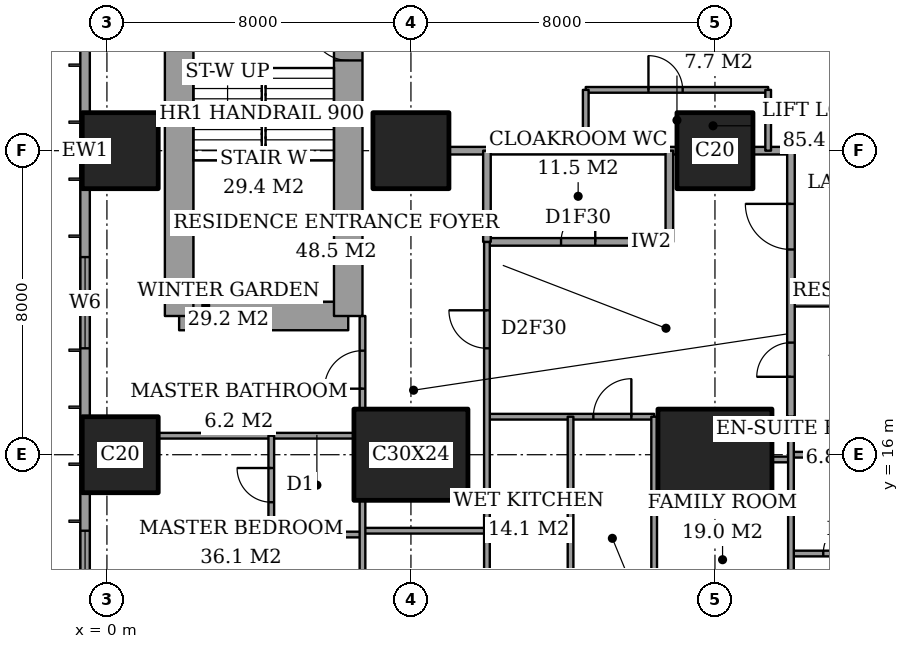
"""IFC4 building model, lengths in metres.
Left out: names, types, materials, properties, quantities, classifications, styles, units other than length and angle.
Written with IfcOpenShell. Run it as: python <this file> out.ifc"""

import sys

from ifc_helpers import new_model, si_unit, direction, frame, frame_2d, origin, origin_2d, place, context, subcontext, project, spatial, rectangle, extrude, element, fill, save


model = new_model("IFC4")
c1 = context("Model", 3, precision=1e-05, world=origin(), true_north=direction((0.0, 1.0)))
c2 = subcontext(c1, "Body", "Model", "MODEL_VIEW")
j1 = project(units=[si_unit("LENGTHUNIT", "METRE"), si_unit("PLANEANGLEUNIT", "RADIAN")], contexts=[c1])
p1 = place(None, origin())
s1 = spatial("IfcSite", under=j1, at=p1, CompositionType="ELEMENT")
p2 = place(p1, origin())
s2 = spatial("IfcBuilding", under=s1, at=p2, CompositionType="ELEMENT")
p3 = place(p2, frame((0.0, 0.0, 40.4)))
s3 = spatial("IfcBuildingStorey", under=s2, at=p3, CompositionType="ELEMENT", Elevation=40.4)
for number, where, z_axis, x_axis in (
    (1, (0.35, 16.0, 0.0), (0.0, 0.0, 1.0), (1.0, 0.0, 0.0)),
    (2, (0.35, 24.0, 0.0), (0.0, 0.0, 1.0), (1.0, 0.0, 0.0)),
):
    element("IfcColumn", number, at=place(p3, frame(where, z_axis=z_axis, x_axis=x_axis)), inside=s3, PredefinedType="COLUMN", context=c2, shape_type="SweptSolid", body=[
        extrude(rectangle(XDim=2.0, YDim=2.0, at=origin_2d()), origin(), (0.0, 0.0, 1.0), 3.6),
    ])
p4 = place(p3, frame((8.0, 16.0, 0.0), z_axis=(0.0, 0.0, 1.0), x_axis=(1.0, 0.0, 0.0)))
e3 = element("IfcColumn", 3, at=p4, inside=s3, PredefinedType="COLUMN", context=c2, shape_type="SweptSolid", body=[
    extrude(rectangle(XDim=3.0, YDim=2.4, at=origin_2d()), origin(), (0.0, 0.0, 1.0), 3.6),
])
p5 = place(p3, frame((8.0, 24.0, 0.0), z_axis=(0.0, 0.0, 1.0), x_axis=(1.0, 0.0, 0.0)))
e4 = element("IfcColumn", 4, at=p5, inside=s3, PredefinedType="COLUMN", context=c2, shape_type="SweptSolid", body=[
    extrude(rectangle(XDim=2.0, YDim=2.0, at=origin_2d()), origin(), (0.0, 0.0, 1.0), 3.6),
])
p6 = place(p3, frame((16.0, 16.0, 0.0), z_axis=(0.0, 0.0, 1.0), x_axis=(1.0, 0.0, 0.0)))
e5 = element("IfcColumn", 5, at=p6, inside=s3, PredefinedType="COLUMN", context=c2, shape_type="SweptSolid", body=[
    extrude(rectangle(XDim=3.0, YDim=2.4, at=origin_2d()), origin(), (0.0, 0.0, 1.0), 3.6),
])
p7 = place(p3, frame((16.0, 24.0, 0.0), z_axis=(0.0, 0.0, 1.0), x_axis=(1.0, 0.0, 0.0)))
e6 = element("IfcColumn", 6, at=p7, inside=s3, PredefinedType="COLUMN", context=c2, shape_type="SweptSolid", body=[
    extrude(rectangle(XDim=2.0, YDim=2.0, at=origin_2d()), origin(), (0.0, 0.0, 1.0), 3.6),
])
p8 = place(p3, frame((1.9, 19.65, 0.0), z_axis=(0.0, 0.0, 1.0), x_axis=(1.0, 0.0, 0.0)))
e7 = element("IfcWall", 7, at=p8, inside=s3, PredefinedType="SHEAR", context=c2, shape_type="SweptSolid", body=[
    extrude(rectangle(XDim=4.45, YDim=0.75, at=frame_2d((2.225, 0.0))), origin(), (0.0, 0.0, 1.0), 3.6),
])
p9 = place(p3, frame((6.35, 19.65, 0.0), z_axis=(0.0, 0.0, 1.0), x_axis=(0.0, 1.0, 0.0)))
e8 = element("IfcWall", 8, at=p9, inside=s3, PredefinedType="SHEAR", context=c2, shape_type="SweptSolid", body=[
    extrude(rectangle(XDim=8.7, YDim=0.75, at=frame_2d((4.35, 0.0))), origin(), (0.0, 0.0, 1.0), 3.6),
])
p10 = place(p9, frame((6.725, 0.0, 0.0)))
e9 = element("IfcOpeningElement", 9, at=p10, cuts=e8, PredefinedType="OPENING", context=c2, shape_type="SweptSolid", body=[
    extrude(rectangle(XDim=1.0, YDim=2.1, at=frame_2d((0.5, 1.05))), frame((0.0, 0.385, 0.0), z_axis=(0.0, -1.0, 0.0), x_axis=(1.0, 0.0, 0.0)), (0.0, 0.0, 1.0), 0.77),
])
p11 = place(p3, frame((1.9, 28.35, 0.0), z_axis=(0.0, 0.0, 1.0), x_axis=(0.0, -1.0, 0.0)))
e10 = element("IfcWall", 10, at=p11, inside=s3, PredefinedType="SHEAR", context=c2, shape_type="SweptSolid", body=[
    extrude(rectangle(XDim=8.7, YDim=0.75, at=frame_2d((4.35, 0.0))), origin(), (0.0, 0.0, 1.0), 3.6),
])
p12 = place(p3, frame((-0.575, 44.825, 0.0), z_axis=(0.0, 0.0, 1.0), x_axis=(0.0, -1.0, 0.0)))
e11 = element("IfcWall", 11, at=p12, inside=s3, PredefinedType="SOLIDWALL", context=c2, shape_type="SweptSolid", body=[
    extrude(rectangle(XDim=41.65, YDim=0.25, at=frame_2d((20.825, 0.0))), origin(), (0.0, 0.0, 1.0), 3.6),
])
p13 = place(p12, frame((0.775, 0.0, 0.6)))
e12 = element("IfcOpeningElement", 12, at=p13, cuts=e11, PredefinedType="OPENING", context=c2, shape_type="SweptSolid", body=[
    extrude(rectangle(XDim=2.4, YDim=2.0, at=frame_2d((1.2, 1.0))), frame((0.0, 0.135, 0.0), z_axis=(0.0, -1.0, 0.0), x_axis=(1.0, 0.0, 0.0)), (0.0, 0.0, 1.0), 0.27),
])
p14 = place(p12, frame((6.1, 0.0, 0.6)))
e13 = element("IfcOpeningElement", 13, at=p14, cuts=e11, PredefinedType="OPENING", context=c2, shape_type="SweptSolid", body=[
    extrude(rectangle(XDim=1.2, YDim=2.0, at=frame_2d((0.6, 1.0))), frame((0.0, 0.135, 0.0), z_axis=(0.0, -1.0, 0.0), x_axis=(1.0, 0.0, 0.0)), (0.0, 0.0, 1.0), 0.27),
])
p15 = place(p12, frame((8.425, 0.0, 0.6)))
e14 = element("IfcOpeningElement", 14, at=p15, cuts=e11, PredefinedType="OPENING", context=c2, shape_type="SweptSolid", body=[
    extrude(rectangle(XDim=2.4, YDim=2.0, at=frame_2d((1.2, 1.0))), frame((0.0, 0.135, 0.0), z_axis=(0.0, -1.0, 0.0), x_axis=(1.0, 0.0, 0.0)), (0.0, 0.0, 1.0), 0.27),
])
p16 = place(p12, frame((15.625, 0.0, 0.6)))
e15 = element("IfcOpeningElement", 15, at=p16, cuts=e11, PredefinedType="OPENING", context=c2, shape_type="SweptSolid", body=[
    extrude(rectangle(XDim=2.4, YDim=2.0, at=frame_2d((1.2, 1.0))), frame((0.0, 0.135, 0.0), z_axis=(0.0, -1.0, 0.0), x_axis=(1.0, 0.0, 0.0)), (0.0, 0.0, 1.0), 0.27),
])
p17 = place(p12, frame((23.625, 0.0, 0.6)))
e16 = element("IfcOpeningElement", 16, at=p17, cuts=e11, PredefinedType="OPENING", context=c2, shape_type="SweptSolid", body=[
    extrude(rectangle(XDim=2.4, YDim=2.0, at=frame_2d((1.2, 1.0))), frame((0.0, 0.135, 0.0), z_axis=(0.0, -1.0, 0.0), x_axis=(1.0, 0.0, 0.0)), (0.0, 0.0, 1.0), 0.27),
])
p18 = place(p12, frame((30.825, 0.0, 0.6)))
e17 = element("IfcOpeningElement", 17, at=p18, cuts=e11, PredefinedType="OPENING", context=c2, shape_type="SweptSolid", body=[
    extrude(rectangle(XDim=2.4, YDim=2.0, at=frame_2d((1.2, 1.0))), frame((0.0, 0.135, 0.0), z_axis=(0.0, -1.0, 0.0), x_axis=(1.0, 0.0, 0.0)), (0.0, 0.0, 1.0), 0.27),
])
p19 = place(p12, frame((34.5, 0.0, 0.6)))
e18 = element("IfcOpeningElement", 18, at=p19, cuts=e11, PredefinedType="OPENING", context=c2, shape_type="SweptSolid", body=[
    extrude(rectangle(XDim=1.2, YDim=2.0, at=frame_2d((0.6, 1.0))), frame((0.0, 0.135, 0.0), z_axis=(0.0, -1.0, 0.0), x_axis=(1.0, 0.0, 0.0)), (0.0, 0.0, 1.0), 0.27),
])
p20 = place(p12, frame((38.475, 0.0, 0.6)))
e19 = element("IfcOpeningElement", 19, at=p20, cuts=e11, PredefinedType="OPENING", context=c2, shape_type="SweptSolid", body=[
    extrude(rectangle(XDim=2.4, YDim=2.0, at=frame_2d((1.2, 1.0))), frame((0.0, 0.135, 0.0), z_axis=(0.0, -1.0, 0.0), x_axis=(1.0, 0.0, 0.0)), (0.0, 0.0, 1.0), 0.27),
])
p21 = place(p3, frame((18.0, 13.4, 0.0), z_axis=(0.0, 0.0, 1.0), x_axis=(1.0, 0.0, 0.0)))
e20 = element("IfcWall", 20, at=p21, inside=s3, PredefinedType="PARTITIONING", context=c2, shape_type="SweptSolid", body=[
    extrude(rectangle(XDim=2.6, YDim=0.15, at=frame_2d((1.3, 0.0))), origin(), (0.0, 0.0, 1.0), 3.35),
])
p22 = place(p21, frame((0.85, 0.0, 0.0)))
e21 = element("IfcOpeningElement", 21, at=p22, cuts=e20, PredefinedType="OPENING", context=c2, shape_type="SweptSolid", body=[
    extrude(rectangle(XDim=0.9, YDim=2.1, at=frame_2d((0.45, 1.05))), frame((0.0, 0.085, 0.0), z_axis=(0.0, -1.0, 0.0), x_axis=(1.0, 0.0, 0.0)), (0.0, 0.0, 1.0), 0.17),
])
p23 = place(p3, frame((4.325, 13.9, 0.0), z_axis=(0.0, 0.0, 1.0), x_axis=(1.0, 0.0, 0.0)))
e22 = element("IfcWall", 22, at=p23, inside=s3, PredefinedType="PARTITIONING", context=c2, shape_type="SweptSolid", body=[
    extrude(rectangle(XDim=2.4, YDim=0.15, at=frame_2d((1.2, 0.0))), origin(), (0.0, 0.0, 1.0), 3.35),
])
p24 = place(p3, frame((6.725, 14.0, 0.0), z_axis=(0.0, 0.0, 1.0), x_axis=(1.0, 0.0, 0.0)))
e23 = element("IfcWall", 23, at=p24, inside=s3, PredefinedType="PARTITIONING", context=c2, shape_type="SweptSolid", body=[
    extrude(rectangle(XDim=3.275, YDim=0.15, at=frame_2d((1.637, 0.0))), origin(), (0.0, 0.0, 1.0), 3.35),
])
p25 = place(p3, frame((17.5, 15.875, 0.0), z_axis=(0.0, 0.0, 1.0), x_axis=(1.0, 0.0, 0.0)))
e24 = element("IfcWall", 24, at=p25, inside=s3, PredefinedType="PARTITIONING", context=c2, shape_type="SweptSolid", body=[
    extrude(rectangle(XDim=0.5, YDim=0.15, at=frame_2d((0.25, 0.0))), origin(), (0.0, 0.0, 1.0), 2.634),
])
p26 = place(p3, frame((18.0, 16.0, 0.0), z_axis=(0.0, 0.0, 1.0), x_axis=(1.0, 0.0, 0.0)))
e25 = element("IfcWall", 25, at=p26, inside=s3, PredefinedType="PARTITIONING", context=c2, shape_type="SweptSolid", body=[
    extrude(rectangle(XDim=6.0, YDim=0.15, at=frame_2d((3.0, 0.0))), origin(), (0.0, 0.0, 1.0), 2.634),
])
p27 = place(p3, frame((1.35, 16.5, 0.0), z_axis=(0.0, 0.0, 1.0), x_axis=(1.0, 0.0, 0.0)))
e26 = element("IfcWall", 26, at=p27, inside=s3, PredefinedType="PARTITIONING", context=c2, shape_type="SweptSolid", body=[
    extrude(rectangle(XDim=5.15, YDim=0.15, at=frame_2d((2.575, 0.0))), origin(), (0.0, 0.0, 1.0), 3.35),
])
p28 = place(p3, frame((10.0, 17.0, 0.0), z_axis=(0.0, 0.0, 1.0), x_axis=(1.0, 0.0, 0.0)))
e27 = element("IfcWall", 27, at=p28, inside=s3, PredefinedType="PARTITIONING", context=c2, shape_type="SweptSolid", body=[
    extrude(rectangle(XDim=4.4, YDim=0.15, at=frame_2d((2.2, 0.0))), origin(), (0.0, 0.0, 1.0), 3.35),
])
p29 = place(p28, frame((2.8, 0.0, 0.0)))
e28 = element("IfcOpeningElement", 28, at=p29, cuts=e27, PredefinedType="OPENING", context=c2, shape_type="SweptSolid", body=[
    extrude(rectangle(XDim=1.0, YDim=2.1, at=frame_2d((0.5, 1.05))), frame((0.0, 0.085, 0.0), z_axis=(0.0, -1.0, 0.0), x_axis=(1.0, 0.0, 0.0)), (0.0, 0.0, 1.0), 0.17),
])
p30 = place(p3, frame((18.0, 20.0, 0.0), z_axis=(0.0, 0.0, 1.0), x_axis=(1.0, 0.0, 0.0)))
e29 = element("IfcWall", 29, at=p30, inside=s3, PredefinedType="PARTITIONING", context=c2, shape_type="SweptSolid", body=[
    extrude(rectangle(XDim=6.0, YDim=0.2, at=frame_2d((3.0, 0.0))), origin(), (0.0, 0.0, 1.0), 3.35),
])
p31 = place(p3, frame((10.0, 21.6, 0.0), z_axis=(0.0, 0.0, 1.0), x_axis=(1.0, 0.0, 0.0)))
e30 = element("IfcWall", 30, at=p31, inside=s3, PredefinedType="PARTITIONING", context=c2, shape_type="SweptSolid", body=[
    extrude(rectangle(XDim=4.8, YDim=0.2, at=frame_2d((2.4, 0.0))), origin(), (0.0, 0.0, 1.0), 3.35),
])
p32 = place(p31, frame((1.95, 0.0, 0.0)))
e31 = element("IfcOpeningElement", 31, at=p32, cuts=e30, PredefinedType="OPENING", context=c2, shape_type="SweptSolid", body=[
    extrude(rectangle(XDim=0.9, YDim=2.1, at=frame_2d((0.45, 1.05))), frame((0.0, 0.11, 0.0), z_axis=(0.0, -1.0, 0.0), x_axis=(1.0, 0.0, 0.0)), (0.0, 0.0, 1.0), 0.22),
])
p33 = place(p3, frame((9.0, 24.0, 0.0), z_axis=(0.0, 0.0, 1.0), x_axis=(1.0, 0.0, 0.0)))
e32 = element("IfcWall", 32, at=p33, inside=s3, PredefinedType="PARTITIONING", context=c2, shape_type="SweptSolid", body=[
    extrude(rectangle(XDim=6.0, YDim=0.2, at=frame_2d((3.0, 0.0))), origin(), (0.0, 0.0, 1.0), 3.35),
])
p34 = place(p3, frame((17.0, 24.0, 0.0), z_axis=(0.0, 0.0, 1.0), x_axis=(1.0, 0.0, 0.0)))
e33 = element("IfcWall", 33, at=p34, inside=s3, PredefinedType="PARTITIONING", context=c2, shape_type="SweptSolid", body=[
    extrude(rectangle(XDim=1.0, YDim=0.2, at=frame_2d((0.5, 0.0))), origin(), (0.0, 0.0, 1.0), 3.35),
])
p35 = place(p3, frame((12.6, 25.6, 0.0), z_axis=(0.0, 0.0, 1.0), x_axis=(1.0, 0.0, 0.0)))
e34 = element("IfcWall", 34, at=p35, inside=s3, PredefinedType="PARTITIONING", context=c2, shape_type="SweptSolid", body=[
    extrude(rectangle(XDim=4.8, YDim=0.15, at=frame_2d((2.4, 0.0))), origin(), (0.0, 0.0, 1.0), 3.35),
])
p36 = place(p35, frame((1.65, 0.0, 0.0)))
e35 = element("IfcOpeningElement", 35, at=p36, cuts=e34, PredefinedType="OPENING", context=c2, shape_type="SweptSolid", body=[
    extrude(rectangle(XDim=0.9, YDim=2.1, at=frame_2d((0.45, 1.05))), frame((0.0, 0.085, 0.0), z_axis=(0.0, -1.0, 0.0), x_axis=(1.0, 0.0, 0.0)), (0.0, 0.0, 1.0), 0.17),
])
p37 = place(p3, frame((4.325, 13.9, 0.0), z_axis=(0.0, 0.0, 1.0), x_axis=(0.0, 1.0, 0.0)))
e36 = element("IfcWall", 36, at=p37, inside=s3, PredefinedType="PARTITIONING", context=c2, shape_type="SweptSolid", body=[
    extrude(rectangle(XDim=2.6, YDim=0.15, at=frame_2d((1.3, 0.0))), origin(), (0.0, 0.0, 1.0), 3.35),
])
p38 = place(p37, frame((0.85, 0.0, 0.0)))
e37 = element("IfcOpeningElement", 37, at=p38, cuts=e36, PredefinedType="OPENING", context=c2, shape_type="SweptSolid", body=[
    extrude(rectangle(XDim=0.9, YDim=2.1, at=frame_2d((0.45, 1.05))), frame((0.0, 0.085, 0.0), z_axis=(0.0, -1.0, 0.0), x_axis=(1.0, 0.0, 0.0)), (0.0, 0.0, 1.0), 0.17),
])
p39 = place(p3, frame((6.725, 10.6, 0.0), z_axis=(0.0, 0.0, 1.0), x_axis=(0.0, 1.0, 0.0)))
e38 = element("IfcWall", 38, at=p39, inside=s3, PredefinedType="PARTITIONING", context=c2, shape_type="SweptSolid", body=[
    extrude(rectangle(XDim=4.2, YDim=0.15, at=frame_2d((2.1, 0.0))), origin(), (0.0, 0.0, 1.0), 3.35),
])
p40 = place(p39, frame((1.2, 0.0, 0.0)))
e39 = element("IfcOpeningElement", 39, at=p40, cuts=e38, PredefinedType="OPENING", context=c2, shape_type="SweptSolid", body=[
    extrude(rectangle(XDim=0.9, YDim=2.1, at=frame_2d((0.45, 1.05))), frame((0.0, 0.085, 0.0), z_axis=(0.0, -1.0, 0.0), x_axis=(1.0, 0.0, 0.0)), (0.0, 0.0, 1.0), 0.17),
])
p41 = place(p3, frame((6.725, 17.2, 0.0), z_axis=(0.0, 0.0, 1.0), x_axis=(0.0, 1.0, 0.0)))
e40 = element("IfcWall", 40, at=p41, inside=s3, PredefinedType="PARTITIONING", context=c2, shape_type="SweptSolid", body=[
    extrude(rectangle(XDim=2.45, YDim=0.15, at=frame_2d((1.225, 0.0))), origin(), (0.0, 0.0, 1.0), 3.35),
])
p42 = place(p41, frame((0.538, 0.0, 0.0)))
e41 = element("IfcOpeningElement", 41, at=p42, cuts=e40, PredefinedType="OPENING", context=c2, shape_type="SweptSolid", body=[
    extrude(rectangle(XDim=1.0, YDim=2.1, at=frame_2d((0.5, 1.05))), frame((0.0, 0.085, 0.0), z_axis=(0.0, -1.0, 0.0), x_axis=(1.0, 0.0, 0.0)), (0.0, 0.0, 1.0), 0.17),
])
p43 = place(p3, frame((10.0, 21.6, 0.0), z_axis=(0.0, 0.0, 1.0), x_axis=(0.0, 1.0, 0.0)))
e42 = element("IfcWall", 42, at=p43, inside=s3, PredefinedType="PARTITIONING", context=c2, shape_type="SweptSolid", body=[
    extrude(rectangle(XDim=2.4, YDim=0.2, at=frame_2d((1.2, 0.0))), origin(), (0.0, 0.0, 1.0), 3.35),
])
p44 = place(p3, frame((10.0, 10.6, 0.0), z_axis=(0.0, 0.0, 1.0), x_axis=(0.0, 1.0, 0.0)))
e43 = element("IfcWall", 43, at=p44, inside=s3, PredefinedType="PARTITIONING", context=c2, shape_type="SweptSolid", body=[
    extrude(rectangle(XDim=11.0, YDim=0.15, at=frame_2d((5.5, 0.0))), origin(), (0.0, 0.0, 1.0), 3.35),
])
p45 = place(p44, frame((8.2, 0.0, 0.0)))
e44 = element("IfcOpeningElement", 44, at=p45, cuts=e43, PredefinedType="OPENING", context=c2, shape_type="SweptSolid", body=[
    extrude(rectangle(XDim=1.0, YDim=2.1, at=frame_2d((0.5, 1.05))), frame((0.0, 0.085, 0.0), z_axis=(0.0, -1.0, 0.0), x_axis=(1.0, 0.0, 0.0)), (0.0, 0.0, 1.0), 0.17),
])
p46 = place(p3, frame((12.2, 10.6, 0.0), z_axis=(0.0, 0.0, 1.0), x_axis=(0.0, 1.0, 0.0)))
e45 = element("IfcWall", 45, at=p46, inside=s3, PredefinedType="PARTITIONING", context=c2, shape_type="SweptSolid", body=[
    extrude(rectangle(XDim=6.4, YDim=0.15, at=frame_2d((3.2, 0.0))), origin(), (0.0, 0.0, 1.0), 3.35),
])
p47 = place(p3, frame((12.6, 24.0, 0.0), z_axis=(0.0, 0.0, 1.0), x_axis=(0.0, 1.0, 0.0)))
e46 = element("IfcWall", 46, at=p47, inside=s3, PredefinedType="PARTITIONING", context=c2, shape_type="SweptSolid", body=[
    extrude(rectangle(XDim=1.6, YDim=0.15, at=frame_2d((0.8, 0.0))), origin(), (0.0, 0.0, 1.0), 3.35),
])
p48 = place(p3, frame((14.4, 10.6, 0.0), z_axis=(0.0, 0.0, 1.0), x_axis=(0.0, 1.0, 0.0)))
e47 = element("IfcWall", 47, at=p48, inside=s3, PredefinedType="PARTITIONING", context=c2, shape_type="SweptSolid", body=[
    extrude(rectangle(XDim=6.4, YDim=0.15, at=frame_2d((3.2, 0.0))), origin(), (0.0, 0.0, 1.0), 3.35),
])
p49 = place(p3, frame((14.8, 21.6, 0.0), z_axis=(0.0, 0.0, 1.0), x_axis=(0.0, 1.0, 0.0)))
e48 = element("IfcWall", 48, at=p49, inside=s3, PredefinedType="PARTITIONING", context=c2, shape_type="SweptSolid", body=[
    extrude(rectangle(XDim=2.4, YDim=0.2, at=frame_2d((1.2, 0.0))), origin(), (0.0, 0.0, 1.0), 3.35),
])
p50 = place(p3, frame((17.4, 24.0, 0.0), z_axis=(0.0, 0.0, 1.0), x_axis=(0.0, 1.0, 0.0)))
e49 = element("IfcWall", 49, at=p50, inside=s3, PredefinedType="PARTITIONING", context=c2, shape_type="SweptSolid", body=[
    extrude(rectangle(XDim=1.6, YDim=0.15, at=frame_2d((0.8, 0.0))), origin(), (0.0, 0.0, 1.0), 3.35),
])
p51 = place(p3, frame((18.0, 17.0, 0.0), z_axis=(0.0, 0.0, 1.0), x_axis=(0.0, 1.0, 0.0)))
e50 = element("IfcWall", 50, at=p51, inside=s3, PredefinedType="PARTITIONING", context=c2, shape_type="SweptSolid", body=[
    extrude(rectangle(XDim=7.0, YDim=0.2, at=frame_2d((3.5, 0.0))), origin(), (0.0, 0.0, 1.0), 3.35),
])
p52 = place(p51, frame((4.4, 0.0, 0.0)))
e51 = element("IfcOpeningElement", 51, at=p52, cuts=e50, PredefinedType="OPENING", context=c2, shape_type="SweptSolid", body=[
    extrude(rectangle(XDim=1.2, YDim=2.4, at=frame_2d((0.6, 1.2))), frame((0.0, 0.11, 0.0), z_axis=(0.0, -1.0, 0.0), x_axis=(1.0, 0.0, 0.0)), (0.0, 0.0, 1.0), 0.22),
])
p53 = place(p51, frame((1.05, 0.0, 0.0)))
e52 = element("IfcOpeningElement", 52, at=p53, cuts=e50, PredefinedType="OPENING", context=c2, shape_type="SweptSolid", body=[
    extrude(rectangle(XDim=0.9, YDim=2.1, at=frame_2d((0.45, 1.05))), frame((0.0, 0.11, 0.0), z_axis=(0.0, -1.0, 0.0), x_axis=(1.0, 0.0, 0.0)), (0.0, 0.0, 1.0), 0.22),
])
p54 = place(p3, frame((18.0, 10.6, 0.0), z_axis=(0.0, 0.0, 1.0), x_axis=(0.0, 1.0, 0.0)))
e53 = element("IfcWall", 53, at=p54, inside=s3, PredefinedType="PARTITIONING", context=c2, shape_type="SweptSolid", body=[
    extrude(rectangle(XDim=6.4, YDim=0.15, at=frame_2d((3.2, 0.0))), origin(), (0.0, 0.0, 1.0), 3.35),
])
p55 = place(p17, origin())
e54 = element("IfcWindow", 54, at=p55, inside=s3, PartitioningType="SINGLE_PANEL", PredefinedType="WINDOW", context=c2, shape_type="SweptSolid", body=[
    extrude(rectangle(XDim=2.4, YDim=2.0, at=frame_2d((1.2, 1.0))), frame((0.0, 0.03, 0.0), z_axis=(0.0, -1.0, 0.0), x_axis=(1.0, 0.0, 0.0)), (0.0, 0.0, 1.0), 0.06),
])
fill(e16, e54)
p56 = place(p18, origin())
e55 = element("IfcWindow", 55, at=p56, inside=s3, PartitioningType="SINGLE_PANEL", PredefinedType="WINDOW", context=c2, shape_type="SweptSolid", body=[
    extrude(rectangle(XDim=2.4, YDim=2.0, at=frame_2d((1.2, 1.0))), frame((0.0, 0.03, 0.0), z_axis=(0.0, -1.0, 0.0), x_axis=(1.0, 0.0, 0.0)), (0.0, 0.0, 1.0), 0.06),
])
fill(e17, e55)
p57 = place(p38, origin())
e56 = element("IfcDoor", 56, at=p57, inside=s3, OperationType="SINGLE_SWING_LEFT", PredefinedType="DOOR", context=c2, shape_type="SweptSolid", body=[
    extrude(rectangle(XDim=0.9, YDim=2.1, at=frame_2d((0.45, 1.05))), frame((0.0, 0.025, 0.0), z_axis=(0.0, -1.0, 0.0), x_axis=(1.0, 0.0, 0.0)), (0.0, 0.0, 1.0), 0.05),
])
fill(e37, e56)
p58 = place(p42, origin())
e57 = element("IfcDoor", 57, at=p58, inside=s3, OperationType="SINGLE_SWING_RIGHT", PredefinedType="DOOR", context=c2, shape_type="SweptSolid", body=[
    extrude(rectangle(XDim=1.0, YDim=2.1, at=frame_2d((0.5, 1.05))), frame((0.0, 0.025, 0.0), z_axis=(0.0, -1.0, 0.0), x_axis=(1.0, 0.0, 0.0)), (0.0, 0.0, 1.0), 0.05),
])
fill(e41, e57)
p59 = place(p45, origin())
e58 = element("IfcDoor", 58, at=p59, inside=s3, OperationType="SINGLE_SWING_LEFT", PredefinedType="DOOR", context=c2, shape_type="SweptSolid", body=[
    extrude(rectangle(XDim=1.0, YDim=2.1, at=frame_2d((0.5, 1.05))), frame((0.0, 0.025, 0.0), z_axis=(0.0, -1.0, 0.0), x_axis=(1.0, 0.0, 0.0)), (0.0, 0.0, 1.0), 0.05),
])
fill(e44, e58)
p60 = place(p32, origin())
e59 = element("IfcDoor", 59, at=p60, inside=s3, OperationType="SINGLE_SWING_LEFT", PredefinedType="DOOR", context=c2, shape_type="SweptSolid", body=[
    extrude(rectangle(XDim=0.9, YDim=2.1, at=frame_2d((0.45, 1.05))), frame((0.0, 0.025, 0.0), z_axis=(0.0, -1.0, 0.0), x_axis=(1.0, 0.0, 0.0)), (0.0, 0.0, 1.0), 0.05),
])
fill(e31, e59)
p61 = place(p52, origin())
e60 = element("IfcDoor", 60, at=p61, inside=s3, OperationType="SINGLE_SWING_LEFT", PredefinedType="DOOR", context=c2, shape_type="SweptSolid", body=[
    extrude(rectangle(XDim=1.2, YDim=2.4, at=frame_2d((0.6, 1.2))), frame((0.0, 0.025, 0.0), z_axis=(0.0, -1.0, 0.0), x_axis=(1.0, 0.0, 0.0)), (0.0, 0.0, 1.0), 0.05),
])
fill(e51, e60)
p62 = place(p29, origin())
e61 = element("IfcDoor", 61, at=p62, inside=s3, OperationType="SINGLE_SWING_LEFT", PredefinedType="DOOR", context=c2, shape_type="SweptSolid", body=[
    extrude(rectangle(XDim=1.0, YDim=2.1, at=frame_2d((0.5, 1.05))), frame((0.0, 0.025, 0.0), z_axis=(0.0, -1.0, 0.0), x_axis=(1.0, 0.0, 0.0)), (0.0, 0.0, 1.0), 0.05),
])
fill(e28, e61)
p63 = place(p22, origin())
e62 = element("IfcDoor", 62, at=p63, inside=s3, OperationType="SINGLE_SWING_LEFT", PredefinedType="DOOR", context=c2, shape_type="SweptSolid", body=[
    extrude(rectangle(XDim=0.9, YDim=2.1, at=frame_2d((0.45, 1.05))), frame((0.0, 0.025, 0.0), z_axis=(0.0, -1.0, 0.0), x_axis=(1.0, 0.0, 0.0)), (0.0, 0.0, 1.0), 0.05),
])
fill(e21, e62)
p64 = place(p53, origin())
e63 = element("IfcDoor", 63, at=p64, inside=s3, OperationType="SINGLE_SWING_RIGHT", PredefinedType="DOOR", context=c2, shape_type="SweptSolid", body=[
    extrude(rectangle(XDim=0.9, YDim=2.1, at=frame_2d((0.45, 1.05))), frame((0.0, 0.025, 0.0), z_axis=(0.0, -1.0, 0.0), x_axis=(1.0, 0.0, 0.0)), (0.0, 0.0, 1.0), 0.05),
])
fill(e52, e63)
p65 = place(p36, origin())
e64 = element("IfcDoor", 64, at=p65, inside=s3, OperationType="SINGLE_SWING_RIGHT", PredefinedType="DOOR", context=c2, shape_type="SweptSolid", body=[
    extrude(rectangle(XDim=0.9, YDim=2.1, at=frame_2d((0.45, 1.05))), frame((0.0, 0.025, 0.0), z_axis=(0.0, -1.0, 0.0), x_axis=(1.0, 0.0, 0.0)), (0.0, 0.0, 1.0), 0.05),
])
fill(e35, e64)
p66 = place(p10, origin())
e65 = element("IfcDoor", 65, at=p66, inside=s3, OperationType="SINGLE_SWING_LEFT", PredefinedType="DOOR", context=c2, shape_type="SweptSolid", body=[
    extrude(rectangle(XDim=1.0, YDim=2.1, at=frame_2d((0.5, 1.05))), frame((0.0, 0.025, 0.0), z_axis=(0.0, -1.0, 0.0), x_axis=(1.0, 0.0, 0.0)), (0.0, 0.0, 1.0), 0.05),
])
fill(e9, e65)
save(model, sys.argv[1])
